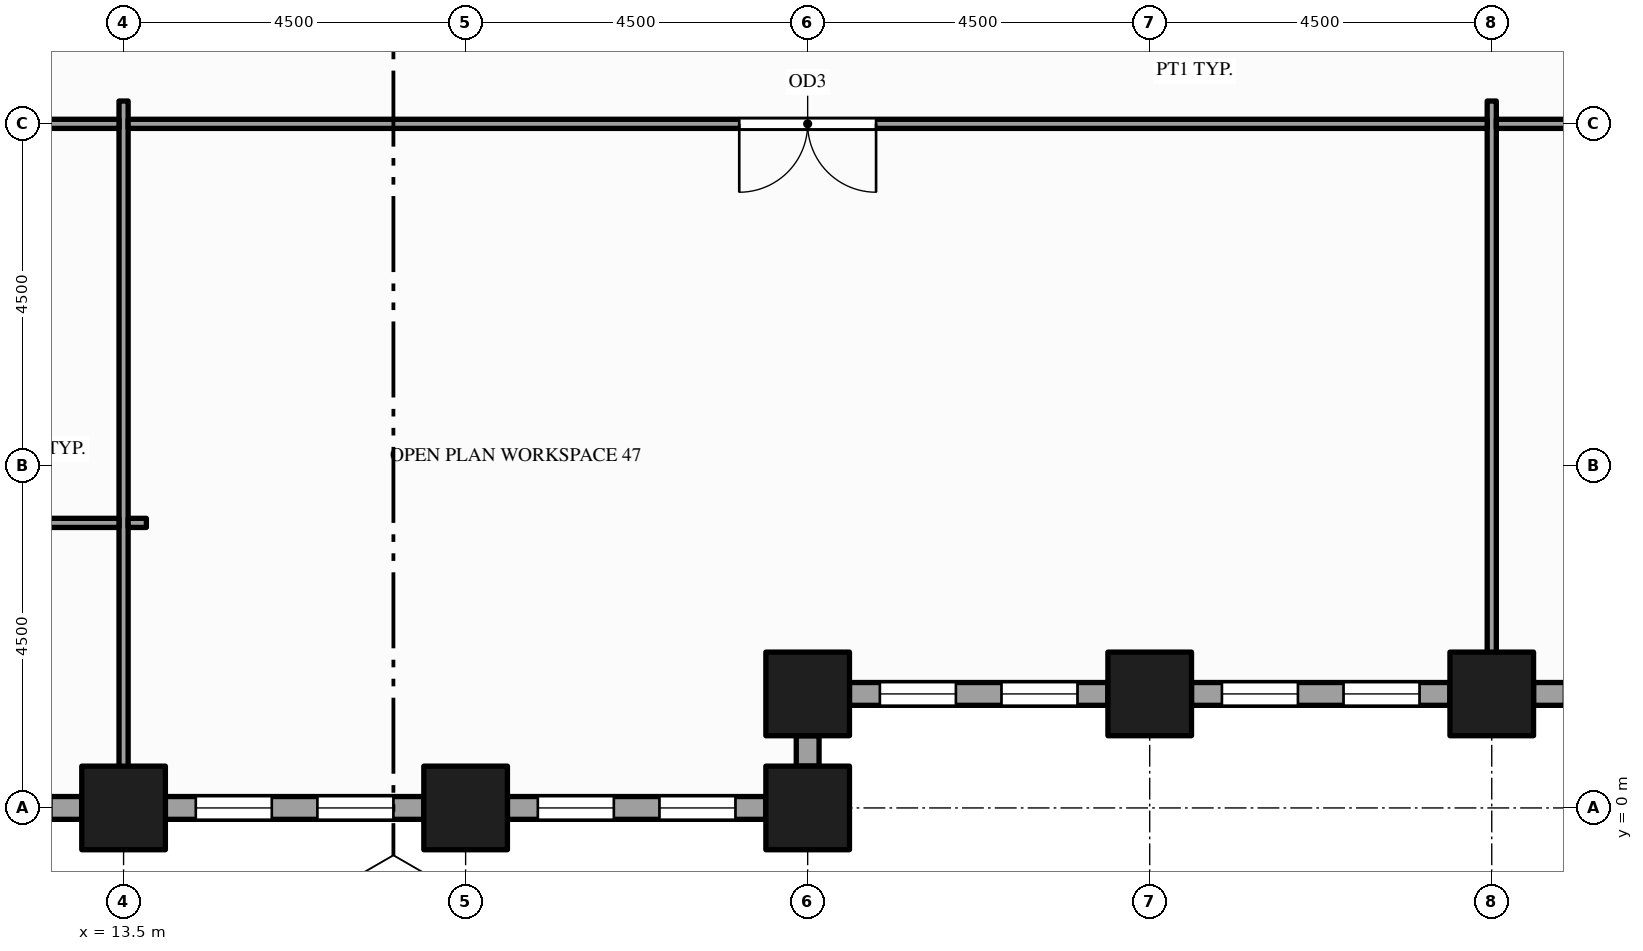
"""IFC4 building model, lengths in metres.
Left out: names, types, materials, properties, quantities, classifications, styles, units other than length and angle.
Written with IfcOpenShell. Run it as: python <this file> out.ifc"""

import sys

from ifc_helpers import new_model, si_unit, direction, frame, frame_2d, origin, origin_2d, place, context, subcontext, project, spatial, rectangle, hollow_rectangle, extrude, element, fill, save


model = new_model("IFC4")
c1 = context("Model", 3, precision=1e-05, world=origin(), true_north=direction((0.0, 1.0)))
c2 = subcontext(c1, "Body", "Model", "MODEL_VIEW")
j1 = project(units=[si_unit("LENGTHUNIT", "METRE"), si_unit("PLANEANGLEUNIT", "RADIAN")], contexts=[c1])
p1 = place(None, origin())
s1 = spatial("IfcSite", under=j1, at=p1, CompositionType="ELEMENT")
p2 = place(p1, origin())
s2 = spatial("IfcBuilding", under=s1, at=p2, CompositionType="ELEMENT")
p3 = place(p2, frame((0.0, 0.0, 61.0)))
s3 = spatial("IfcBuildingStorey", under=s2, at=p3, CompositionType="ELEMENT", Elevation=61.0)
for number, where, z_axis, x_axis in (
    (1, (13.5, 0.0, -0.15), (0.0, 0.0, 1.0), (1.0, 0.0, 0.0)),
    (2, (18.0, 0.0, -0.15), (0.0, 0.0, 1.0), (1.0, 0.0, 0.0)),
    (3, (22.5, 0.0, -0.15), (0.0, 0.0, 1.0), (1.0, 0.0, 0.0)),
    (4, (22.5, 1.5, -0.15), (0.0, 0.0, 1.0), (1.0, 0.0, 0.0)),
    (5, (27.0, 1.5, -0.15), (0.0, 0.0, 1.0), (1.0, 0.0, 0.0)),
    (6, (31.5, 1.5, -0.15), (0.0, 0.0, 1.0), (1.0, 0.0, 0.0)),
):
    element("IfcColumn", number, at=place(p3, frame(where, z_axis=z_axis, x_axis=x_axis)), inside=s3, PredefinedType="COLUMN", context=c2, shape_type="SweptSolid", body=[
        extrude(hollow_rectangle(XDim=1.1, YDim=1.1, WallThickness=0.06, at=origin_2d()), origin(), (0.0, 0.0, 1.0), 4.0),
    ])
p4 = place(p3, frame((9.55, 0.0, 0.0), z_axis=(0.0, 0.0, 1.0), x_axis=(1.0, 0.0, 0.0)))
e7 = element("IfcWall", 7, at=p4, inside=s3, PredefinedType="STANDARD", context=c2, shape_type="SweptSolid", body=[
    extrude(rectangle(XDim=3.4, YDim=0.3, at=frame_2d((1.7, 0.0))), origin(), (0.0, 0.0, 1.0), 3.144),
])
p5 = place(p4, frame((0.4, 0.0, 0.9)))
e8 = element("IfcOpeningElement", 8, at=p5, cuts=e7, PredefinedType="OPENING", context=c2, shape_type="SweptSolid", body=[
    extrude(rectangle(XDim=1.0, YDim=2.0, at=frame_2d((0.5, 1.0))), frame((0.0, 0.16, 0.0), z_axis=(0.0, -1.0, 0.0), x_axis=(1.0, 0.0, 0.0)), (0.0, 0.0, 1.0), 0.32),
])
p6 = place(p4, frame((2.0, 0.0, 0.9)))
e9 = element("IfcOpeningElement", 9, at=p6, cuts=e7, PredefinedType="OPENING", context=c2, shape_type="SweptSolid", body=[
    extrude(rectangle(XDim=1.0, YDim=2.0, at=frame_2d((0.5, 1.0))), frame((0.0, 0.16, 0.0), z_axis=(0.0, -1.0, 0.0), x_axis=(1.0, 0.0, 0.0)), (0.0, 0.0, 1.0), 0.32),
])
p7 = place(p3, frame((14.05, 0.0, 0.0), z_axis=(0.0, 0.0, 1.0), x_axis=(1.0, 0.0, 0.0)))
e10 = element("IfcWall", 10, at=p7, inside=s3, PredefinedType="STANDARD", context=c2, shape_type="SweptSolid", body=[
    extrude(rectangle(XDim=3.4, YDim=0.3, at=frame_2d((1.7, 0.0))), origin(), (0.0, 0.0, 1.0), 3.144),
])
p8 = place(p7, frame((0.4, 0.0, 0.9)))
e11 = element("IfcOpeningElement", 11, at=p8, cuts=e10, PredefinedType="OPENING", context=c2, shape_type="SweptSolid", body=[
    extrude(rectangle(XDim=1.0, YDim=2.0, at=frame_2d((0.5, 1.0))), frame((0.0, 0.16, 0.0), z_axis=(0.0, -1.0, 0.0), x_axis=(1.0, 0.0, 0.0)), (0.0, 0.0, 1.0), 0.32),
])
p9 = place(p7, frame((2.0, 0.0, 0.9)))
e12 = element("IfcOpeningElement", 12, at=p9, cuts=e10, PredefinedType="OPENING", context=c2, shape_type="SweptSolid", body=[
    extrude(rectangle(XDim=1.0, YDim=2.0, at=frame_2d((0.5, 1.0))), frame((0.0, 0.16, 0.0), z_axis=(0.0, -1.0, 0.0), x_axis=(1.0, 0.0, 0.0)), (0.0, 0.0, 1.0), 0.32),
])
p10 = place(p3, frame((18.55, 0.0, 0.0), z_axis=(0.0, 0.0, 1.0), x_axis=(1.0, 0.0, 0.0)))
e13 = element("IfcWall", 13, at=p10, inside=s3, PredefinedType="STANDARD", context=c2, shape_type="SweptSolid", body=[
    extrude(rectangle(XDim=3.4, YDim=0.3, at=frame_2d((1.7, 0.0))), origin(), (0.0, 0.0, 1.0), 3.144),
])
p11 = place(p10, frame((0.4, 0.0, 0.9)))
e14 = element("IfcOpeningElement", 14, at=p11, cuts=e13, PredefinedType="OPENING", context=c2, shape_type="SweptSolid", body=[
    extrude(rectangle(XDim=1.0, YDim=2.0, at=frame_2d((0.5, 1.0))), frame((0.0, 0.16, 0.0), z_axis=(0.0, -1.0, 0.0), x_axis=(1.0, 0.0, 0.0)), (0.0, 0.0, 1.0), 0.32),
])
p12 = place(p10, frame((2.0, 0.0, 0.9)))
e15 = element("IfcOpeningElement", 15, at=p12, cuts=e13, PredefinedType="OPENING", context=c2, shape_type="SweptSolid", body=[
    extrude(rectangle(XDim=1.0, YDim=2.0, at=frame_2d((0.5, 1.0))), frame((0.0, 0.16, 0.0), z_axis=(0.0, -1.0, 0.0), x_axis=(1.0, 0.0, 0.0)), (0.0, 0.0, 1.0), 0.32),
])
p13 = place(p3, frame((22.5, 0.55, 0.0), z_axis=(0.0, 0.0, 1.0), x_axis=(0.0, 1.0, 0.0)))
e16 = element("IfcWall", 16, at=p13, inside=s3, PredefinedType="STANDARD", context=c2, shape_type="SweptSolid", body=[
    extrude(rectangle(XDim=0.4, YDim=0.3, at=frame_2d((0.2, 0.0))), origin(), (0.0, 0.0, 1.0), 3.144),
])
p14 = place(p3, frame((23.05, 1.5, 0.0), z_axis=(0.0, 0.0, 1.0), x_axis=(1.0, 0.0, 0.0)))
e17 = element("IfcWall", 17, at=p14, inside=s3, PredefinedType="STANDARD", context=c2, shape_type="SweptSolid", body=[
    extrude(rectangle(XDim=3.4, YDim=0.3, at=frame_2d((1.7, 0.0))), origin(), (0.0, 0.0, 1.0), 3.144),
])
p15 = place(p14, frame((0.4, 0.0, 0.9)))
e18 = element("IfcOpeningElement", 18, at=p15, cuts=e17, PredefinedType="OPENING", context=c2, shape_type="SweptSolid", body=[
    extrude(rectangle(XDim=1.0, YDim=2.0, at=frame_2d((0.5, 1.0))), frame((0.0, 0.16, 0.0), z_axis=(0.0, -1.0, 0.0), x_axis=(1.0, 0.0, 0.0)), (0.0, 0.0, 1.0), 0.32),
])
p16 = place(p14, frame((2.0, 0.0, 0.9)))
e19 = element("IfcOpeningElement", 19, at=p16, cuts=e17, PredefinedType="OPENING", context=c2, shape_type="SweptSolid", body=[
    extrude(rectangle(XDim=1.0, YDim=2.0, at=frame_2d((0.5, 1.0))), frame((0.0, 0.16, 0.0), z_axis=(0.0, -1.0, 0.0), x_axis=(1.0, 0.0, 0.0)), (0.0, 0.0, 1.0), 0.32),
])
p17 = place(p3, frame((27.55, 1.5, 0.0), z_axis=(0.0, 0.0, 1.0), x_axis=(1.0, 0.0, 0.0)))
e20 = element("IfcWall", 20, at=p17, inside=s3, PredefinedType="STANDARD", context=c2, shape_type="SweptSolid", body=[
    extrude(rectangle(XDim=3.4, YDim=0.3, at=frame_2d((1.7, 0.0))), origin(), (0.0, 0.0, 1.0), 3.144),
])
p18 = place(p17, frame((0.4, 0.0, 0.9)))
e21 = element("IfcOpeningElement", 21, at=p18, cuts=e20, PredefinedType="OPENING", context=c2, shape_type="SweptSolid", body=[
    extrude(rectangle(XDim=1.0, YDim=2.0, at=frame_2d((0.5, 1.0))), frame((0.0, 0.16, 0.0), z_axis=(0.0, -1.0, 0.0), x_axis=(1.0, 0.0, 0.0)), (0.0, 0.0, 1.0), 0.32),
])
p19 = place(p17, frame((2.0, 0.0, 0.9)))
e22 = element("IfcOpeningElement", 22, at=p19, cuts=e20, PredefinedType="OPENING", context=c2, shape_type="SweptSolid", body=[
    extrude(rectangle(XDim=1.0, YDim=2.0, at=frame_2d((0.5, 1.0))), frame((0.0, 0.16, 0.0), z_axis=(0.0, -1.0, 0.0), x_axis=(1.0, 0.0, 0.0)), (0.0, 0.0, 1.0), 0.32),
])
p20 = place(p3, frame((32.05, 1.5, 0.0), z_axis=(0.0, 0.0, 1.0), x_axis=(1.0, 0.0, 0.0)))
e23 = element("IfcWall", 23, at=p20, inside=s3, PredefinedType="STANDARD", context=c2, shape_type="SweptSolid", body=[
    extrude(rectangle(XDim=3.4, YDim=0.3, at=frame_2d((1.7, 0.0))), origin(), (0.0, 0.0, 1.0), 3.144),
])
p21 = place(p20, frame((0.4, 0.0, 0.9)))
e24 = element("IfcOpeningElement", 24, at=p21, cuts=e23, PredefinedType="OPENING", context=c2, shape_type="SweptSolid", body=[
    extrude(rectangle(XDim=1.0, YDim=2.0, at=frame_2d((0.5, 1.0))), frame((0.0, 0.16, 0.0), z_axis=(0.0, -1.0, 0.0), x_axis=(1.0, 0.0, 0.0)), (0.0, 0.0, 1.0), 0.32),
])
p22 = place(p20, frame((2.0, 0.0, 0.9)))
e25 = element("IfcOpeningElement", 25, at=p22, cuts=e23, PredefinedType="OPENING", context=c2, shape_type="SweptSolid", body=[
    extrude(rectangle(XDim=1.0, YDim=2.0, at=frame_2d((0.5, 1.0))), frame((0.0, 0.16, 0.0), z_axis=(0.0, -1.0, 0.0), x_axis=(1.0, 0.0, 0.0)), (0.0, 0.0, 1.0), 0.32),
])
p23 = place(p3, frame((13.5, 0.15, 0.0), z_axis=(0.0, 0.0, 1.0), x_axis=(0.0, 1.0, 0.0)))
e26 = element("IfcWall", 26, at=p23, inside=s3, PredefinedType="PARTITIONING", context=c2, shape_type="SweptSolid", body=[
    extrude(rectangle(XDim=9.15, YDim=0.12, at=frame_2d((4.575, 0.0))), origin(), (0.0, 0.0, 1.0), 2.938),
])
p24 = place(p3, frame((31.5, 1.65, 0.0), z_axis=(0.0, 0.0, 1.0), x_axis=(0.0, 1.0, 0.0)))
e27 = element("IfcWall", 27, at=p24, inside=s3, PredefinedType="PARTITIONING", context=c2, shape_type="SweptSolid", body=[
    extrude(rectangle(XDim=7.65, YDim=0.12, at=frame_2d((3.825, 0.0))), origin(), (0.0, 0.0, 1.0), 2.938),
])
p25 = place(p3, frame((9.125, 3.75, 0.0), z_axis=(0.0, 0.0, 1.0), x_axis=(1.0, 0.0, 0.0)))
e28 = element("IfcWall", 28, at=p25, inside=s3, PredefinedType="PARTITIONING", context=c2, shape_type="SweptSolid", body=[
    extrude(rectangle(XDim=4.315, YDim=0.12, at=frame_2d((2.157, 0.0))), origin(), (0.0, 0.0, 1.0), 2.938),
])
p26 = place(p3, frame((13.56, 3.75, 0.0), z_axis=(0.0, 0.0, 1.0), x_axis=(1.0, 0.0, 0.0)))
e29 = element("IfcWall", 29, at=p26, inside=s3, PredefinedType="PARTITIONING", context=c2, shape_type="SweptSolid", body=[
    extrude(rectangle(XDim=0.24, YDim=0.12, at=frame_2d((0.12, 0.0))), origin(), (0.0, 0.0, 1.0), 2.938),
])
p27 = place(p3, frame((0.15, 9.0, 0.0), z_axis=(0.0, 0.0, 1.0), x_axis=(1.0, 0.0, 0.0)))
e30 = element("IfcWall", 30, at=p27, inside=s3, PredefinedType="PARTITIONING", context=c2, shape_type="SweptSolid", body=[
    extrude(rectangle(XDim=13.29, YDim=0.12, at=frame_2d((6.645, 0.0))), origin(), (0.0, 0.0, 1.0), 2.938),
])
p28 = place(p27, frame((6.055, 0.0, 0.0)))
e31 = element("IfcOpeningElement", 31, at=p28, cuts=e30, PredefinedType="OPENING", context=c2, shape_type="SweptSolid", body=[
    extrude(rectangle(XDim=1.2, YDim=2.1, at=frame_2d((0.6, 1.05))), frame((0.0, 0.07, 0.0), z_axis=(0.0, -1.0, 0.0), x_axis=(1.0, 0.0, 0.0)), (0.0, 0.0, 1.0), 0.14),
])
p29 = place(p3, frame((13.56, 9.0, 0.0), z_axis=(0.0, 0.0, 1.0), x_axis=(1.0, 0.0, 0.0)))
e32 = element("IfcWall", 32, at=p29, inside=s3, PredefinedType="PARTITIONING", context=c2, shape_type="SweptSolid", body=[
    extrude(rectangle(XDim=17.88, YDim=0.12, at=frame_2d((8.94, 0.0))), origin(), (0.0, 0.0, 1.0), 2.938),
])
p30 = place(p29, frame((8.04, 0.0, 0.0)))
e33 = element("IfcOpeningElement", 33, at=p30, cuts=e32, PredefinedType="OPENING", context=c2, shape_type="SweptSolid", body=[
    extrude(rectangle(XDim=1.8, YDim=2.1, at=frame_2d((0.9, 1.05))), frame((0.0, 0.07, 0.0), z_axis=(0.0, -1.0, 0.0), x_axis=(1.0, 0.0, 0.0)), (0.0, 0.0, 1.0), 0.14),
])
p31 = place(p3, frame((31.56, 9.0, 0.0), z_axis=(0.0, 0.0, 1.0), x_axis=(1.0, 0.0, 0.0)))
e34 = element("IfcWall", 34, at=p31, inside=s3, PredefinedType="PARTITIONING", context=c2, shape_type="SweptSolid", body=[
    extrude(rectangle(XDim=4.38, YDim=0.12, at=frame_2d((2.19, 0.0))), origin(), (0.0, 0.0, 1.0), 2.938),
])
p32 = place(p31, frame((1.69, 0.0, 0.0)))
e35 = element("IfcOpeningElement", 35, at=p32, cuts=e34, PredefinedType="OPENING", context=c2, shape_type="SweptSolid", body=[
    extrude(rectangle(XDim=1.0, YDim=2.1, at=frame_2d((0.5, 1.05))), frame((0.0, 0.07, 0.0), z_axis=(0.0, -1.0, 0.0), x_axis=(1.0, 0.0, 0.0)), (0.0, 0.0, 1.0), 0.14),
])
p33 = place(p8, origin())
e36 = element("IfcWindow", 36, at=p33, inside=s3, PartitioningType="SINGLE_PANEL", PredefinedType="WINDOW", context=c2, shape_type="SweptSolid", body=[
    extrude(rectangle(XDim=1.0, YDim=2.0, at=frame_2d((0.5, 1.0))), frame((0.0, 0.03, 0.0), z_axis=(0.0, -1.0, 0.0), x_axis=(1.0, 0.0, 0.0)), (0.0, 0.0, 1.0), 0.06),
])
fill(e11, e36)
p34 = place(p9, origin())
e37 = element("IfcWindow", 37, at=p34, inside=s3, PartitioningType="SINGLE_PANEL", PredefinedType="WINDOW", context=c2, shape_type="SweptSolid", body=[
    extrude(rectangle(XDim=1.0, YDim=2.0, at=frame_2d((0.5, 1.0))), frame((0.0, 0.03, 0.0), z_axis=(0.0, -1.0, 0.0), x_axis=(1.0, 0.0, 0.0)), (0.0, 0.0, 1.0), 0.06),
])
fill(e12, e37)
p35 = place(p11, origin())
e38 = element("IfcWindow", 38, at=p35, inside=s3, PartitioningType="SINGLE_PANEL", PredefinedType="WINDOW", context=c2, shape_type="SweptSolid", body=[
    extrude(rectangle(XDim=1.0, YDim=2.0, at=frame_2d((0.5, 1.0))), frame((0.0, 0.03, 0.0), z_axis=(0.0, -1.0, 0.0), x_axis=(1.0, 0.0, 0.0)), (0.0, 0.0, 1.0), 0.06),
])
fill(e14, e38)
p36 = place(p12, origin())
e39 = element("IfcWindow", 39, at=p36, inside=s3, PartitioningType="SINGLE_PANEL", PredefinedType="WINDOW", context=c2, shape_type="SweptSolid", body=[
    extrude(rectangle(XDim=1.0, YDim=2.0, at=frame_2d((0.5, 1.0))), frame((0.0, 0.03, 0.0), z_axis=(0.0, -1.0, 0.0), x_axis=(1.0, 0.0, 0.0)), (0.0, 0.0, 1.0), 0.06),
])
fill(e15, e39)
p37 = place(p15, origin())
e40 = element("IfcWindow", 40, at=p37, inside=s3, PartitioningType="SINGLE_PANEL", PredefinedType="WINDOW", context=c2, shape_type="SweptSolid", body=[
    extrude(rectangle(XDim=1.0, YDim=2.0, at=frame_2d((0.5, 1.0))), frame((0.0, 0.03, 0.0), z_axis=(0.0, -1.0, 0.0), x_axis=(1.0, 0.0, 0.0)), (0.0, 0.0, 1.0), 0.06),
])
fill(e18, e40)
p38 = place(p16, origin())
e41 = element("IfcWindow", 41, at=p38, inside=s3, PartitioningType="SINGLE_PANEL", PredefinedType="WINDOW", context=c2, shape_type="SweptSolid", body=[
    extrude(rectangle(XDim=1.0, YDim=2.0, at=frame_2d((0.5, 1.0))), frame((0.0, 0.03, 0.0), z_axis=(0.0, -1.0, 0.0), x_axis=(1.0, 0.0, 0.0)), (0.0, 0.0, 1.0), 0.06),
])
fill(e19, e41)
p39 = place(p18, origin())
e42 = element("IfcWindow", 42, at=p39, inside=s3, PartitioningType="SINGLE_PANEL", PredefinedType="WINDOW", context=c2, shape_type="SweptSolid", body=[
    extrude(rectangle(XDim=1.0, YDim=2.0, at=frame_2d((0.5, 1.0))), frame((0.0, 0.03, 0.0), z_axis=(0.0, -1.0, 0.0), x_axis=(1.0, 0.0, 0.0)), (0.0, 0.0, 1.0), 0.06),
])
fill(e21, e42)
p40 = place(p19, origin())
e43 = element("IfcWindow", 43, at=p40, inside=s3, PartitioningType="SINGLE_PANEL", PredefinedType="WINDOW", context=c2, shape_type="SweptSolid", body=[
    extrude(rectangle(XDim=1.0, YDim=2.0, at=frame_2d((0.5, 1.0))), frame((0.0, 0.03, 0.0), z_axis=(0.0, -1.0, 0.0), x_axis=(1.0, 0.0, 0.0)), (0.0, 0.0, 1.0), 0.06),
])
fill(e22, e43)
p41 = place(p30, origin())
e44 = element("IfcDoor", 44, at=p41, inside=s3, OperationType="DOUBLE_DOOR_SINGLE_SWING", PredefinedType="DOOR", context=c2, shape_type="SweptSolid", body=[
    extrude(rectangle(XDim=1.8, YDim=2.1, at=frame_2d((0.9, 1.05))), frame((0.0, 0.025, 0.0), z_axis=(0.0, -1.0, 0.0), x_axis=(1.0, 0.0, 0.0)), (0.0, 0.0, 1.0), 0.05),
])
fill(e33, e44)
save(model, sys.argv[1])
